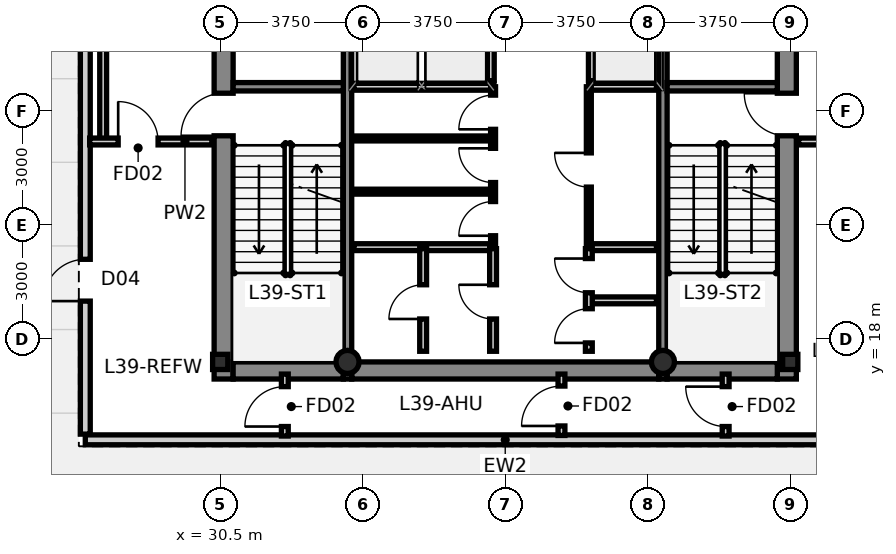
"""IFC4 building model, lengths in metres.
Left out: names, types, materials, properties, quantities, classifications, styles, units other than length and angle.
Written with IfcOpenShell. Run it as: python <this file> out.ifc"""

import sys

from ifc_helpers import new_model, si_unit, direction, frame, frame_2d, origin, origin_2d, place, context, subcontext, project, spatial, rectangle, hollow_circle, i_section, extrude, source, transform, mapped, element, fill, save


model = new_model("IFC4")
c1 = context("Model", 3, precision=1e-05, world=origin(), true_north=direction((0.0, 1.0)))
c2 = subcontext(c1, "Body", "Model", "MODEL_VIEW")
j1 = project(units=[si_unit("LENGTHUNIT", "METRE"), si_unit("PLANEANGLEUNIT", "RADIAN")], contexts=[c1])
p1 = place(None, origin())
s1 = spatial("IfcSite", under=j1, at=p1, CompositionType="ELEMENT")
p2 = place(p1, origin())
s2 = spatial("IfcBuilding", under=s1, at=p2, CompositionType="ELEMENT")
p3 = place(p2, frame((0.0, 0.0, 150.05)))
s3 = spatial("IfcBuildingStorey", under=s2, at=p3, CompositionType="ELEMENT", Elevation=150.05)
m1 = source(origin(), c2, "Body", "SweptSolid", [
    extrude(i_section(OverallWidth=0.4, OverallDepth=0.4, WebThickness=0.02, FlangeThickness=0.032, at=origin_2d()), origin(), (0.0, 0.0, 1.0), 4.8),
])
for number, where, z_axis, x_axis in (
    (1, (30.5, 17.4, 0.0), (0.0, 0.0, 1.0), (1.0, 0.0, 0.0)),
    (2, (45.5, 17.4, 0.0), (0.0, 0.0, 1.0), (1.0, 0.0, 0.0)),
):
    element("IfcColumn", number, at=place(p3, frame(where, z_axis=z_axis, x_axis=x_axis)), inside=s3, PredefinedType="COLUMN", context=c2, shape_type="MappedRepresentation", body=[
        mapped(m1, transform((0.0, 0.0, 0.0), scale=1.0)),
    ])
m2 = source(origin(), c2, "Body", "SweptSolid", [
    extrude(hollow_circle(Radius=0.305, WallThickness=0.025, at=origin_2d()), origin(), (0.0, 0.0, 1.0), 4.8),
])
for number, where, z_axis, x_axis in (
    (3, (33.85, 17.4, 0.0), (0.0, 0.0, 1.0), (1.0, 0.0, 0.0)),
    (4, (42.15, 17.4, 0.0), (0.0, 0.0, 1.0), (1.0, 0.0, 0.0)),
):
    element("IfcColumn", number, at=place(p3, frame(where, z_axis=z_axis, x_axis=x_axis)), inside=s3, PredefinedType="COLUMN", context=c2, shape_type="MappedRepresentation", body=[
        mapped(m2, transform((0.0, 0.0, 0.0), scale=1.0)),
    ])
p4 = place(p3, frame((30.59, 16.95, 0.0), z_axis=(0.0, 0.0, 1.0), x_axis=(0.0, 1.0, 0.0)))
e5 = element("IfcWall", 5, at=p4, inside=s3, PredefinedType="SHEAR", context=c2, shape_type="SweptSolid", body=[
    extrude(rectangle(XDim=13.275, YDim=0.5, at=frame_2d((6.638, 0.0))), origin(), (0.0, 0.0, 1.0), 4.8),
])
p5 = place(p4, frame((6.4, 0.0, 0.0)))
e6 = element("IfcOpeningElement", 6, at=p5, cuts=e5, PredefinedType="OPENING", context=c2, shape_type="SweptSolid", body=[
    extrude(rectangle(XDim=1.12, YDim=2.15, at=frame_2d((0.56, 1.075))), frame((0.0, 0.262, 0.0), z_axis=(0.0, -1.0, 0.0), x_axis=(1.0, 0.0, 0.0)), (0.0, 0.0, 1.0), 0.524),
])
p6 = place(p4, frame((10.85, 0.0, 0.0)))
e7 = element("IfcOpeningElement", 7, at=p6, cuts=e5, PredefinedType="OPENING", context=c2, shape_type="SweptSolid", body=[
    extrude(rectangle(XDim=1.2, YDim=2.2, at=frame_2d((0.6, 1.1))), frame((0.0, 0.262, 0.0), z_axis=(0.0, -1.0, 0.0), x_axis=(1.0, 0.0, 0.0)), (0.0, 0.0, 1.0), 0.524),
])
p7 = place(p3, frame((45.41, 16.95, 0.0), z_axis=(0.0, 0.0, 1.0), x_axis=(0.0, 1.0, 0.0)))
e8 = element("IfcWall", 8, at=p7, inside=s3, PredefinedType="SHEAR", context=c2, shape_type="SweptSolid", body=[
    extrude(rectangle(XDim=13.275, YDim=0.5, at=frame_2d((6.638, 0.0))), origin(), (0.0, 0.0, 1.0), 4.8),
])
p8 = place(p7, frame((6.4, 0.0, 0.0)))
e9 = element("IfcOpeningElement", 9, at=p8, cuts=e8, PredefinedType="OPENING", context=c2, shape_type="SweptSolid", body=[
    extrude(rectangle(XDim=1.12, YDim=2.15, at=frame_2d((0.56, 1.075))), frame((0.0, 0.262, 0.0), z_axis=(0.0, -1.0, 0.0), x_axis=(1.0, 0.0, 0.0)), (0.0, 0.0, 1.0), 0.524),
])
p9 = place(p7, frame((10.85, 0.0, 0.0)))
e10 = element("IfcOpeningElement", 10, at=p9, cuts=e8, PredefinedType="OPENING", context=c2, shape_type="SweptSolid", body=[
    extrude(rectangle(XDim=1.2, YDim=2.2, at=frame_2d((0.6, 1.1))), frame((0.0, 0.262, 0.0), z_axis=(0.0, -1.0, 0.0), x_axis=(1.0, 0.0, 0.0)), (0.0, 0.0, 1.0), 0.524),
])
p10 = place(p3, frame((30.84, 17.175, 0.0), z_axis=(0.0, 0.0, 1.0), x_axis=(1.0, 0.0, 0.0)))
e11 = element("IfcWall", 11, at=p10, inside=s3, PredefinedType="SHEAR", context=c2, shape_type="SweptSolid", body=[
    extrude(rectangle(XDim=2.9, YDim=0.45, at=frame_2d((1.45, 0.0))), origin(), (0.0, 0.0, 1.0), 4.8),
])
p11 = place(p3, frame((33.96, 17.175, 0.0), z_axis=(0.0, 0.0, 1.0), x_axis=(1.0, 0.0, 0.0)))
e12 = element("IfcWall", 12, at=p11, inside=s3, PredefinedType="SHEAR", context=c2, shape_type="SweptSolid", body=[
    extrude(rectangle(XDim=8.08, YDim=0.45, at=frame_2d((4.04, 0.0))), origin(), (0.0, 0.0, 1.0), 4.8),
])
p12 = place(p3, frame((42.26, 17.175, 0.0), z_axis=(0.0, 0.0, 1.0), x_axis=(1.0, 0.0, 0.0)))
e13 = element("IfcWall", 13, at=p12, inside=s3, PredefinedType="SHEAR", context=c2, shape_type="SweptSolid", body=[
    extrude(rectangle(XDim=2.9, YDim=0.45, at=frame_2d((1.45, 0.0))), origin(), (0.0, 0.0, 1.0), 4.8),
])
for number, where, z_axis, x_axis in (
    (14, (33.85, 16.95, 0.0), (0.0, 0.0, 1.0), (0.0, 1.0, 0.0)),
    (15, (42.15, 16.95, 0.0), (0.0, 0.0, 1.0), (0.0, 1.0, 0.0)),
):
    element("IfcWall", number, at=place(p3, frame(where, z_axis=z_axis, x_axis=x_axis)), inside=s3, PredefinedType="SHEAR", context=c2, shape_type="SweptSolid", body=[
        extrude(rectangle(XDim=13.275, YDim=0.22, at=frame_2d((6.638, 0.0))), origin(), (0.0, 0.0, 1.0), 4.8),
    ])
for number, where, z_axis, x_axis in (
    (16, (30.84, 24.64, 0.0), (0.0, 0.0, 1.0), (1.0, 0.0, 0.0)),
    (17, (42.26, 24.64, 0.0), (0.0, 0.0, 1.0), (1.0, 0.0, 0.0)),
):
    element("IfcWall", number, at=place(p3, frame(where, z_axis=z_axis, x_axis=x_axis)), inside=s3, PredefinedType="SHEAR", context=c2, shape_type="SweptSolid", body=[
        extrude(rectangle(XDim=2.9, YDim=0.22, at=frame_2d((1.45, 0.0))), origin(), (0.0, 0.0, 1.0), 4.8),
    ])
p13 = place(p3, frame((26.95, 15.35, 0.0), z_axis=(0.0, 0.0, 1.0), x_axis=(1.0, 0.0, 0.0)))
e18 = element("IfcWall", 18, at=p13, inside=s3, PredefinedType="STANDARD", context=c2, shape_type="SweptSolid", body=[
    extrude(rectangle(XDim=22.1, YDim=0.26, at=frame_2d((11.05, 0.0))), origin(), (0.0, 0.0, 1.0), 4.55),
])
p14 = place(p3, frame((26.95, 15.5, 0.0), z_axis=(0.0, 0.0, 1.0), x_axis=(0.0, 1.0, 0.0)))
e19 = element("IfcWall", 19, at=p14, inside=s3, PredefinedType="STANDARD", context=c2, shape_type="SweptSolid", body=[
    extrude(rectangle(XDim=17.0, YDim=0.26, at=frame_2d((8.5, 0.0))), origin(), (0.0, 0.0, 1.0), 4.228),
])
p15 = place(p14, frame((3.5, 0.0, 0.0)))
e20 = element("IfcOpeningElement", 20, at=p15, cuts=e19, PredefinedType="OPENING", context=c2, shape_type="SweptSolid", body=[
    extrude(rectangle(XDim=1.1, YDim=2.2, at=frame_2d((0.55, 1.1))), frame((0.0, 0.142, 0.0), z_axis=(0.0, -1.0, 0.0), x_axis=(1.0, 0.0, 0.0)), (0.0, 0.0, 1.0), 0.284),
])
for number, where, z_axis, x_axis in (
    (21, (37.62, 24.8, 0.0), (0.0, 0.0, 1.0), (0.0, 1.0, 0.0)),
    (22, (40.28, 24.8, 0.0), (0.0, 0.0, 1.0), (0.0, 1.0, 0.0)),
):
    element("IfcWall", number, at=place(p3, frame(where, z_axis=z_axis, x_axis=x_axis)), inside=s3, PredefinedType="PARTITIONING", context=c2, shape_type="SweptSolid", body=[
        extrude(rectangle(XDim=2.0, YDim=0.18, at=frame_2d((1.0, 0.0))), origin(), (0.0, 0.0, 1.0), 4.55),
    ])
p16 = place(p3, frame((34.02, 24.64, 0.0), z_axis=(0.0, 0.0, 1.0), x_axis=(1.0, 0.0, 0.0)))
e23 = element("IfcWall", 23, at=p16, inside=s3, PredefinedType="PARTITIONING", context=c2, shape_type="SweptSolid", body=[
    extrude(rectangle(XDim=3.68, YDim=0.18, at=frame_2d((1.84, 0.0))), origin(), (0.0, 0.0, 1.0), 4.55),
])
p17 = place(p3, frame((40.2, 24.64, 0.0), z_axis=(0.0, 0.0, 1.0), x_axis=(1.0, 0.0, 0.0)))
e24 = element("IfcWall", 24, at=p17, inside=s3, PredefinedType="PARTITIONING", context=c2, shape_type="SweptSolid", body=[
    extrude(rectangle(XDim=1.78, YDim=0.18, at=frame_2d((0.89, 0.0))), origin(), (0.0, 0.0, 1.0), 4.55),
])
p18 = place(p3, frame((27.42, 23.2, 0.0), z_axis=(0.0, 0.0, 1.0), x_axis=(0.0, 1.0, 0.0)))
e25 = element("IfcWall", 25, at=p18, inside=s3, PredefinedType="PARTITIONING", context=c2, shape_type="SweptSolid", body=[
    extrude(rectangle(XDim=6.4, YDim=0.18, at=frame_2d((3.2, 0.0))), origin(), (0.0, 0.0, 1.0), 4.228),
])
p19 = place(p3, frame((27.065, 23.2, 0.0), z_axis=(0.0, 0.0, 1.0), x_axis=(1.0, 0.0, 0.0)))
e26 = element("IfcWall", 26, at=p19, inside=s3, PredefinedType="PARTITIONING", context=c2, shape_type="SweptSolid", body=[
    extrude(rectangle(XDim=3.215, YDim=0.18, at=frame_2d((1.607, 0.0))), origin(), (0.0, 0.0, 1.0), 4.55),
])
p20 = place(p19, frame((0.75, 0.0, 0.0)))
e27 = element("IfcOpeningElement", 27, at=p20, cuts=e26, PredefinedType="OPENING", context=c2, shape_type="SweptSolid", body=[
    extrude(rectangle(XDim=1.05, YDim=2.15, at=frame_2d((0.525, 1.075))), frame((0.0, 0.102, 0.0), z_axis=(0.0, -1.0, 0.0), x_axis=(1.0, 0.0, 0.0)), (0.0, 0.0, 1.0), 0.204),
])
p21 = place(p3, frame((45.72, 23.2, 0.0), z_axis=(0.0, 0.0, 1.0), x_axis=(1.0, 0.0, 0.0)))
e28 = element("IfcWall", 28, at=p21, inside=s3, PredefinedType="PARTITIONING", context=c2, shape_type="SweptSolid", body=[
    extrude(rectangle(XDim=3.215, YDim=0.18, at=frame_2d((1.607, 0.0))), origin(), (0.0, 0.0, 1.0), 4.55),
])
p22 = place(p21, frame((0.75, 0.0, 0.0)))
e29 = element("IfcOpeningElement", 29, at=p22, cuts=e28, PredefinedType="OPENING", context=c2, shape_type="SweptSolid", body=[
    extrude(rectangle(XDim=1.05, YDim=2.15, at=frame_2d((0.525, 1.075))), frame((0.0, 0.102, 0.0), z_axis=(0.0, -1.0, 0.0), x_axis=(1.0, 0.0, 0.0)), (0.0, 0.0, 1.0), 0.204),
])
p23 = place(p3, frame((34.02, 20.42, 0.0), z_axis=(0.0, 0.0, 1.0), x_axis=(1.0, 0.0, 0.0)))
e30 = element("IfcWall", 30, at=p23, inside=s3, PredefinedType="PARTITIONING", context=c2, shape_type="SweptSolid", body=[
    extrude(rectangle(XDim=3.64, YDim=0.18, at=frame_2d((1.82, 0.0))), origin(), (0.0, 0.0, 1.0), 4.55),
])
p24 = place(p3, frame((40.22, 20.42, 0.0), z_axis=(0.0, 0.0, 1.0), x_axis=(1.0, 0.0, 0.0)))
e31 = element("IfcWall", 31, at=p24, inside=s3, PredefinedType="PARTITIONING", context=c2, shape_type="SweptSolid", body=[
    extrude(rectangle(XDim=1.76, YDim=0.18, at=frame_2d((0.88, 0.0))), origin(), (0.0, 0.0, 1.0), 4.55),
])
for number, where, z_axis, x_axis in (
    (32, (34.02, 21.88, 0.0), (0.0, 0.0, 1.0), (1.0, 0.0, 0.0)),
    (33, (34.02, 23.28, 0.0), (0.0, 0.0, 1.0), (1.0, 0.0, 0.0)),
):
    element("IfcWall", number, at=place(p3, frame(where, z_axis=z_axis, x_axis=x_axis)), inside=s3, PredefinedType="PARTITIONING", context=c2, shape_type="SweptSolid", body=[
        extrude(rectangle(XDim=3.58, YDim=0.13, at=frame_2d((1.79, 0.0))), origin(), (0.0, 0.0, 1.0), 4.55),
    ])
p25 = place(p3, frame((37.68, 20.5, 0.0), z_axis=(0.0, 0.0, 1.0), x_axis=(0.0, 1.0, 0.0)))
e34 = element("IfcWall", 34, at=p25, inside=s3, PredefinedType="PARTITIONING", context=c2, shape_type="SweptSolid", body=[
    extrude(rectangle(XDim=4.14, YDim=0.13, at=frame_2d((2.07, 0.0))), origin(), (0.0, 0.0, 1.0), 4.55),
])
p26 = place(p25, frame((0.22, 0.0, 0.0)))
e35 = element("IfcOpeningElement", 35, at=p26, cuts=e34, PredefinedType="OPENING", context=c2, shape_type="SweptSolid", body=[
    extrude(rectangle(XDim=0.9, YDim=2.1, at=frame_2d((0.45, 1.05))), frame((0.0, 0.077, 0.0), z_axis=(0.0, -1.0, 0.0), x_axis=(1.0, 0.0, 0.0)), (0.0, 0.0, 1.0), 0.154),
])
p27 = place(p25, frame((1.62, 0.0, 0.0)))
e36 = element("IfcOpeningElement", 36, at=p27, cuts=e34, PredefinedType="OPENING", context=c2, shape_type="SweptSolid", body=[
    extrude(rectangle(XDim=0.9, YDim=2.1, at=frame_2d((0.45, 1.05))), frame((0.0, 0.077, 0.0), z_axis=(0.0, -1.0, 0.0), x_axis=(1.0, 0.0, 0.0)), (0.0, 0.0, 1.0), 0.154),
])
p28 = place(p25, frame((3.02, 0.0, 0.0)))
e37 = element("IfcOpeningElement", 37, at=p28, cuts=e34, PredefinedType="OPENING", context=c2, shape_type="SweptSolid", body=[
    extrude(rectangle(XDim=0.9, YDim=2.1, at=frame_2d((0.45, 1.05))), frame((0.0, 0.077, 0.0), z_axis=(0.0, -1.0, 0.0), x_axis=(1.0, 0.0, 0.0)), (0.0, 0.0, 1.0), 0.154),
])
p29 = place(p3, frame((40.2, 20.5, 0.0), z_axis=(0.0, 0.0, 1.0), x_axis=(0.0, 1.0, 0.0)))
e38 = element("IfcWall", 38, at=p29, inside=s3, PredefinedType="PARTITIONING", context=c2, shape_type="SweptSolid", body=[
    extrude(rectangle(XDim=4.14, YDim=0.13, at=frame_2d((2.07, 0.0))), origin(), (0.0, 0.0, 1.0), 4.55),
])
p30 = place(p29, frame((1.5, 0.0, 0.0)))
e39 = element("IfcOpeningElement", 39, at=p30, cuts=e38, PredefinedType="OPENING", context=c2, shape_type="SweptSolid", body=[
    extrude(rectangle(XDim=0.9, YDim=2.1, at=frame_2d((0.45, 1.05))), frame((0.0, 0.077, 0.0), z_axis=(0.0, -1.0, 0.0), x_axis=(1.0, 0.0, 0.0)), (0.0, 0.0, 1.0), 0.154),
])
p31 = place(p3, frame((35.84, 17.68, 0.0), z_axis=(0.0, 0.0, 1.0), x_axis=(0.0, 1.0, 0.0)))
e40 = element("IfcWall", 40, at=p31, inside=s3, PredefinedType="PARTITIONING", context=c2, shape_type="SweptSolid", body=[
    extrude(rectangle(XDim=2.7, YDim=0.18, at=frame_2d((1.35, 0.0))), origin(), (0.0, 0.0, 1.0), 4.55),
])
p32 = place(p31, frame((0.85, 0.0, 0.0)))
e41 = element("IfcOpeningElement", 41, at=p32, cuts=e40, PredefinedType="OPENING", context=c2, shape_type="SweptSolid", body=[
    extrude(rectangle(XDim=0.9, YDim=2.1, at=frame_2d((0.45, 1.05))), frame((0.0, 0.102, 0.0), z_axis=(0.0, -1.0, 0.0), x_axis=(1.0, 0.0, 0.0)), (0.0, 0.0, 1.0), 0.204),
])
p33 = place(p3, frame((37.68, 17.68, 0.0), z_axis=(0.0, 0.0, 1.0), x_axis=(0.0, 1.0, 0.0)))
e42 = element("IfcWall", 42, at=p33, inside=s3, PredefinedType="PARTITIONING", context=c2, shape_type="SweptSolid", body=[
    extrude(rectangle(XDim=2.7, YDim=0.18, at=frame_2d((1.35, 0.0))), origin(), (0.0, 0.0, 1.0), 4.55),
])
p34 = place(p33, frame((0.85, 0.0, 0.0)))
e43 = element("IfcOpeningElement", 43, at=p34, cuts=e42, PredefinedType="OPENING", context=c2, shape_type="SweptSolid", body=[
    extrude(rectangle(XDim=0.9, YDim=2.1, at=frame_2d((0.45, 1.05))), frame((0.0, 0.102, 0.0), z_axis=(0.0, -1.0, 0.0), x_axis=(1.0, 0.0, 0.0)), (0.0, 0.0, 1.0), 0.204),
])
p35 = place(p3, frame((40.28, 19.02, 0.0), z_axis=(0.0, 0.0, 1.0), x_axis=(1.0, 0.0, 0.0)))
e44 = element("IfcWall", 44, at=p35, inside=s3, PredefinedType="PARTITIONING", context=c2, shape_type="SweptSolid", body=[
    extrude(rectangle(XDim=1.7, YDim=0.18, at=frame_2d((0.85, 0.0))), origin(), (0.0, 0.0, 1.0), 4.55),
])
p36 = place(p3, frame((40.2, 17.68, 0.0), z_axis=(0.0, 0.0, 1.0), x_axis=(0.0, 1.0, 0.0)))
e45 = element("IfcWall", 45, at=p36, inside=s3, PredefinedType="PARTITIONING", context=c2, shape_type="SweptSolid", body=[
    extrude(rectangle(XDim=2.7, YDim=0.18, at=frame_2d((1.35, 0.0))), origin(), (0.0, 0.0, 1.0), 4.55),
])
p37 = place(p36, frame((0.22, 0.0, 0.0)))
e46 = element("IfcOpeningElement", 46, at=p37, cuts=e45, PredefinedType="OPENING", context=c2, shape_type="SweptSolid", body=[
    extrude(rectangle(XDim=0.9, YDim=2.1, at=frame_2d((0.45, 1.05))), frame((0.0, 0.102, 0.0), z_axis=(0.0, -1.0, 0.0), x_axis=(1.0, 0.0, 0.0)), (0.0, 0.0, 1.0), 0.204),
])
p38 = place(p36, frame((1.54, 0.0, 0.0)))
e47 = element("IfcOpeningElement", 47, at=p38, cuts=e45, PredefinedType="OPENING", context=c2, shape_type="SweptSolid", body=[
    extrude(rectangle(XDim=0.9, YDim=2.1, at=frame_2d((0.45, 1.05))), frame((0.0, 0.102, 0.0), z_axis=(0.0, -1.0, 0.0), x_axis=(1.0, 0.0, 0.0)), (0.0, 0.0, 1.0), 0.204),
])
p39 = place(p3, frame((32.2, 15.45, 0.0), z_axis=(0.0, 0.0, 1.0), x_axis=(0.0, 1.0, 0.0)))
e48 = element("IfcWall", 48, at=p39, inside=s3, PredefinedType="PARTITIONING", context=c2, shape_type="SweptSolid", body=[
    extrude(rectangle(XDim=1.63, YDim=0.18, at=frame_2d((0.815, 0.0))), origin(), (0.0, 0.0, 1.0), 4.55),
])
p40 = place(p39, frame((0.25, 0.0, 0.0)))
e49 = element("IfcOpeningElement", 49, at=p40, cuts=e48, PredefinedType="OPENING", context=c2, shape_type="SweptSolid", body=[
    extrude(rectangle(XDim=1.05, YDim=2.15, at=frame_2d((0.525, 1.075))), frame((0.0, 0.102, 0.0), z_axis=(0.0, -1.0, 0.0), x_axis=(1.0, 0.0, 0.0)), (0.0, 0.0, 1.0), 0.204),
])
p41 = place(p3, frame((43.8, 15.45, 0.0), z_axis=(0.0, 0.0, 1.0), x_axis=(0.0, 1.0, 0.0)))
e50 = element("IfcWall", 50, at=p41, inside=s3, PredefinedType="PARTITIONING", context=c2, shape_type="SweptSolid", body=[
    extrude(rectangle(XDim=1.63, YDim=0.18, at=frame_2d((0.815, 0.0))), origin(), (0.0, 0.0, 1.0), 4.55),
])
p42 = place(p41, frame((0.25, 0.0, 0.0)))
e51 = element("IfcOpeningElement", 51, at=p42, cuts=e50, PredefinedType="OPENING", context=c2, shape_type="SweptSolid", body=[
    extrude(rectangle(XDim=1.05, YDim=2.15, at=frame_2d((0.525, 1.075))), frame((0.0, 0.102, 0.0), z_axis=(0.0, -1.0, 0.0), x_axis=(1.0, 0.0, 0.0)), (0.0, 0.0, 1.0), 0.204),
])
p43 = place(p3, frame((39.48, 15.465, 0.0), z_axis=(0.0, 0.0, 1.0), x_axis=(0.0, 1.0, 0.0)))
e52 = element("IfcWall", 52, at=p43, inside=s3, PredefinedType="PARTITIONING", context=c2, shape_type="SweptSolid", body=[
    extrude(rectangle(XDim=1.615, YDim=0.18, at=frame_2d((0.808, 0.0))), origin(), (0.0, 0.0, 1.0), 4.55),
])
p44 = place(p43, frame((0.25, 0.0, 0.0)))
e53 = element("IfcOpeningElement", 53, at=p44, cuts=e52, PredefinedType="OPENING", context=c2, shape_type="SweptSolid", body=[
    extrude(rectangle(XDim=1.05, YDim=2.15, at=frame_2d((0.525, 1.075))), frame((0.0, 0.102, 0.0), z_axis=(0.0, -1.0, 0.0), x_axis=(1.0, 0.0, 0.0)), (0.0, 0.0, 1.0), 0.204),
])
p45 = place(p15, origin())
e54 = element("IfcDoor", 54, at=p45, inside=s3, OperationType="SINGLE_SWING_LEFT", PredefinedType="DOOR", context=c2, shape_type="SweptSolid", body=[
    extrude(rectangle(XDim=1.1, YDim=2.2, at=frame_2d((0.55, 1.1))), frame((0.0, 0.025, 0.0), z_axis=(0.0, -1.0, 0.0), x_axis=(1.0, 0.0, 0.0)), (0.0, 0.0, 1.0), 0.05),
])
fill(e20, e54)
p46 = place(p5, origin())
e55 = element("IfcDoor", 55, at=p46, inside=s3, OperationType="SINGLE_SWING_LEFT", PredefinedType="DOOR", context=c2, shape_type="SweptSolid", body=[
    extrude(rectangle(XDim=1.12, YDim=2.15, at=frame_2d((0.56, 1.075))), frame((0.0, 0.025, 0.0), z_axis=(0.0, -1.0, 0.0), x_axis=(1.0, 0.0, 0.0)), (0.0, 0.0, 1.0), 0.05),
])
fill(e6, e55)
p47 = place(p8, origin())
e56 = element("IfcDoor", 56, at=p47, inside=s3, OperationType="SINGLE_SWING_RIGHT", PredefinedType="DOOR", context=c2, shape_type="SweptSolid", body=[
    extrude(rectangle(XDim=1.12, YDim=2.15, at=frame_2d((0.56, 1.075))), frame((0.0, 0.025, 0.0), z_axis=(0.0, -1.0, 0.0), x_axis=(1.0, 0.0, 0.0)), (0.0, 0.0, 1.0), 0.05),
])
fill(e9, e56)
p48 = place(p20, origin())
e57 = element("IfcDoor", 57, at=p48, inside=s3, OperationType="SINGLE_SWING_LEFT", PredefinedType="DOOR", context=c2, shape_type="SweptSolid", body=[
    extrude(rectangle(XDim=1.05, YDim=2.15, at=frame_2d((0.525, 1.075))), frame((0.0, 0.025, 0.0), z_axis=(0.0, -1.0, 0.0), x_axis=(1.0, 0.0, 0.0)), (0.0, 0.0, 1.0), 0.05),
])
fill(e27, e57)
p49 = place(p26, origin())
e58 = element("IfcDoor", 58, at=p49, inside=s3, OperationType="SINGLE_SWING_LEFT", PredefinedType="DOOR", context=c2, shape_type="SweptSolid", body=[
    extrude(rectangle(XDim=0.9, YDim=2.1, at=frame_2d((0.45, 1.05))), frame((0.0, 0.025, 0.0), z_axis=(0.0, -1.0, 0.0), x_axis=(1.0, 0.0, 0.0)), (0.0, 0.0, 1.0), 0.05),
])
fill(e35, e58)
p50 = place(p27, origin())
e59 = element("IfcDoor", 59, at=p50, inside=s3, OperationType="SINGLE_SWING_RIGHT", PredefinedType="DOOR", context=c2, shape_type="SweptSolid", body=[
    extrude(rectangle(XDim=0.9, YDim=2.1, at=frame_2d((0.45, 1.05))), frame((0.0, 0.025, 0.0), z_axis=(0.0, -1.0, 0.0), x_axis=(1.0, 0.0, 0.0)), (0.0, 0.0, 1.0), 0.05),
])
fill(e36, e59)
p51 = place(p28, origin())
e60 = element("IfcDoor", 60, at=p51, inside=s3, OperationType="SINGLE_SWING_LEFT", PredefinedType="DOOR", context=c2, shape_type="SweptSolid", body=[
    extrude(rectangle(XDim=0.9, YDim=2.1, at=frame_2d((0.45, 1.05))), frame((0.0, 0.025, 0.0), z_axis=(0.0, -1.0, 0.0), x_axis=(1.0, 0.0, 0.0)), (0.0, 0.0, 1.0), 0.05),
])
fill(e37, e60)
p52 = place(p30, origin())
e61 = element("IfcDoor", 61, at=p52, inside=s3, OperationType="SINGLE_SWING_RIGHT", PredefinedType="DOOR", context=c2, shape_type="SweptSolid", body=[
    extrude(rectangle(XDim=0.9, YDim=2.1, at=frame_2d((0.45, 1.05))), frame((0.0, 0.025, 0.0), z_axis=(0.0, -1.0, 0.0), x_axis=(1.0, 0.0, 0.0)), (0.0, 0.0, 1.0), 0.05),
])
fill(e39, e61)
p53 = place(p32, origin())
e62 = element("IfcDoor", 62, at=p53, inside=s3, OperationType="SINGLE_SWING_LEFT", PredefinedType="DOOR", context=c2, shape_type="SweptSolid", body=[
    extrude(rectangle(XDim=0.9, YDim=2.1, at=frame_2d((0.45, 1.05))), frame((0.0, 0.025, 0.0), z_axis=(0.0, -1.0, 0.0), x_axis=(1.0, 0.0, 0.0)), (0.0, 0.0, 1.0), 0.05),
])
fill(e41, e62)
p54 = place(p34, origin())
e63 = element("IfcDoor", 63, at=p54, inside=s3, OperationType="SINGLE_SWING_RIGHT", PredefinedType="DOOR", context=c2, shape_type="SweptSolid", body=[
    extrude(rectangle(XDim=0.9, YDim=2.1, at=frame_2d((0.45, 1.05))), frame((0.0, 0.025, 0.0), z_axis=(0.0, -1.0, 0.0), x_axis=(1.0, 0.0, 0.0)), (0.0, 0.0, 1.0), 0.05),
])
fill(e43, e63)
p55 = place(p37, origin())
e64 = element("IfcDoor", 64, at=p55, inside=s3, OperationType="SINGLE_SWING_LEFT", PredefinedType="DOOR", context=c2, shape_type="SweptSolid", body=[
    extrude(rectangle(XDim=0.9, YDim=2.1, at=frame_2d((0.45, 1.05))), frame((0.0, 0.025, 0.0), z_axis=(0.0, -1.0, 0.0), x_axis=(1.0, 0.0, 0.0)), (0.0, 0.0, 1.0), 0.05),
])
fill(e46, e64)
p56 = place(p38, origin())
e65 = element("IfcDoor", 65, at=p56, inside=s3, OperationType="SINGLE_SWING_RIGHT", PredefinedType="DOOR", context=c2, shape_type="SweptSolid", body=[
    extrude(rectangle(XDim=0.9, YDim=2.1, at=frame_2d((0.45, 1.05))), frame((0.0, 0.025, 0.0), z_axis=(0.0, -1.0, 0.0), x_axis=(1.0, 0.0, 0.0)), (0.0, 0.0, 1.0), 0.05),
])
fill(e47, e65)
p57 = place(p40, origin())
e66 = element("IfcDoor", 66, at=p57, inside=s3, OperationType="SINGLE_SWING_LEFT", PredefinedType="DOOR", context=c2, shape_type="SweptSolid", body=[
    extrude(rectangle(XDim=1.05, YDim=2.15, at=frame_2d((0.525, 1.075))), frame((0.0, 0.025, 0.0), z_axis=(0.0, -1.0, 0.0), x_axis=(1.0, 0.0, 0.0)), (0.0, 0.0, 1.0), 0.05),
])
fill(e49, e66)
p58 = place(p42, origin())
e67 = element("IfcDoor", 67, at=p58, inside=s3, OperationType="SINGLE_SWING_RIGHT", PredefinedType="DOOR", context=c2, shape_type="SweptSolid", body=[
    extrude(rectangle(XDim=1.05, YDim=2.15, at=frame_2d((0.525, 1.075))), frame((0.0, 0.025, 0.0), z_axis=(0.0, -1.0, 0.0), x_axis=(1.0, 0.0, 0.0)), (0.0, 0.0, 1.0), 0.05),
])
fill(e51, e67)
p59 = place(p44, origin())
e68 = element("IfcDoor", 68, at=p59, inside=s3, OperationType="SINGLE_SWING_LEFT", PredefinedType="DOOR", context=c2, shape_type="SweptSolid", body=[
    extrude(rectangle(XDim=1.05, YDim=2.15, at=frame_2d((0.525, 1.075))), frame((0.0, 0.025, 0.0), z_axis=(0.0, -1.0, 0.0), x_axis=(1.0, 0.0, 0.0)), (0.0, 0.0, 1.0), 0.05),
])
fill(e53, e68)
save(model, sys.argv[1])
